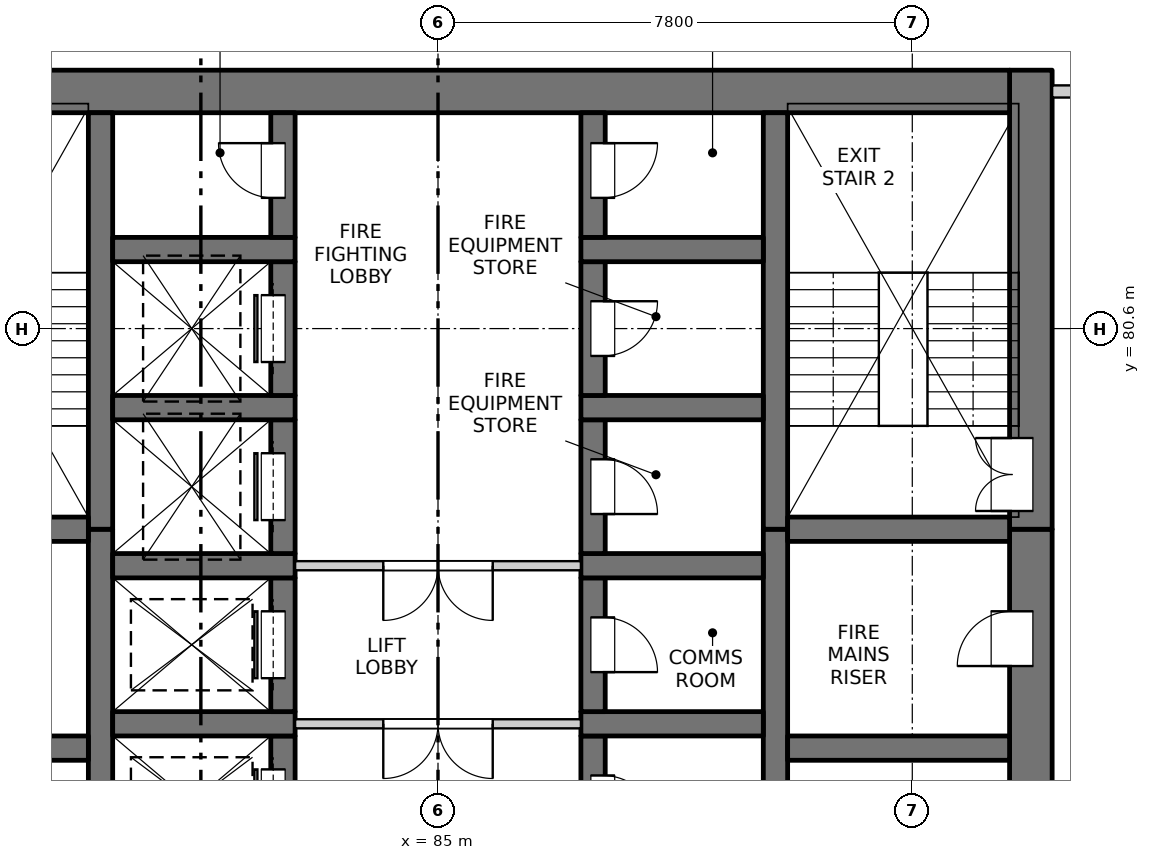
"""IFC4 building model, lengths in metres.
Left out: names, types, materials, properties, quantities, classifications, styles, units other than length and angle.
Written with IfcOpenShell. Run it as: python <this file> out.ifc"""

import sys

from ifc_helpers import new_model, si_unit, direction, frame, frame_2d, origin, place, context, subcontext, project, spatial, rectangle, extrude, element, fill, save


model = new_model("IFC4")
c1 = context("Model", 3, precision=1e-05, world=origin(), true_north=direction((0.0, 1.0)))
c2 = subcontext(c1, "Body", "Model", "MODEL_VIEW")
j1 = project(units=[si_unit("LENGTHUNIT", "METRE"), si_unit("PLANEANGLEUNIT", "RADIAN")], contexts=[c1])
p1 = place(None, origin())
s1 = spatial("IfcSite", under=j1, at=p1, CompositionType="ELEMENT")
p2 = place(p1, origin())
s2 = spatial("IfcBuilding", under=s1, at=p2, CompositionType="ELEMENT")
p3 = place(p2, frame((0.0, 0.0, 71.6)))
s3 = spatial("IfcBuildingStorey", under=s2, at=p3, CompositionType="ELEMENT", Elevation=71.6)
p4 = place(p3, frame((94.75, 61.95, -0.25), z_axis=(0.0, 0.0, 1.0), x_axis=(0.0, 1.0, 0.0)))
e1 = element("IfcWall", 1, at=p4, inside=s3, PredefinedType="SOLIDWALL", context=c2, shape_type="SweptSolid", body=[
    extrude(rectangle(XDim=15.35, YDim=0.7, at=frame_2d((7.675, 0.0))), origin(), (0.0, 0.0, 1.0), 3.4),
])
p5 = place(p4, frame((0.925, 0.0, 0.25)))
e2 = element("IfcOpeningElement", 2, at=p5, cuts=e1, PredefinedType="OPENING", context=c2, shape_type="SweptSolid", body=[
    extrude(rectangle(XDim=0.9, YDim=2.1, at=frame_2d((0.45, 1.05))), frame((0.0, 0.36, 0.0), z_axis=(0.0, -1.0, 0.0), x_axis=(1.0, 0.0, 0.0)), (0.0, 0.0, 1.0), 0.72),
])
p6 = place(p4, frame((3.8, 0.0, 0.25)))
e3 = element("IfcOpeningElement", 3, at=p6, cuts=e1, PredefinedType="OPENING", context=c2, shape_type="SweptSolid", body=[
    extrude(rectangle(XDim=0.9, YDim=2.1, at=frame_2d((0.45, 1.05))), frame((0.0, 0.36, 0.0), z_axis=(0.0, -1.0, 0.0), x_axis=(1.0, 0.0, 0.0)), (0.0, 0.0, 1.0), 0.72),
])
p7 = place(p4, frame((8.3, 0.0, 0.25)))
e4 = element("IfcOpeningElement", 4, at=p7, cuts=e1, PredefinedType="OPENING", context=c2, shape_type="SweptSolid", body=[
    extrude(rectangle(XDim=0.9, YDim=2.1, at=frame_2d((0.45, 1.05))), frame((0.0, 0.36, 0.0), z_axis=(0.0, -1.0, 0.0), x_axis=(1.0, 0.0, 0.0)), (0.0, 0.0, 1.0), 0.72),
])
p8 = place(p4, frame((13.1, 0.0, 0.25)))
e5 = element("IfcOpeningElement", 5, at=p8, cuts=e1, PredefinedType="OPENING", context=c2, shape_type="SweptSolid", body=[
    extrude(rectangle(XDim=0.9, YDim=2.1, at=frame_2d((0.45, 1.05))), frame((0.0, 0.36, 0.0), z_axis=(0.0, -1.0, 0.0), x_axis=(1.0, 0.0, 0.0)), (0.0, 0.0, 1.0), 0.72),
])
p9 = place(p3, frame((94.75, 77.3, -0.25), z_axis=(0.0, 0.0, 1.0), x_axis=(0.0, 1.0, 0.0)))
e6 = element("IfcWall", 6, at=p9, inside=s3, PredefinedType="SOLIDWALL", context=c2, shape_type="SweptSolid", body=[
    extrude(rectangle(XDim=7.55, YDim=0.7, at=frame_2d((3.775, 0.0))), origin(), (0.0, 0.0, 1.0), 3.4),
])
p10 = place(p9, frame((0.3, 0.0, 0.25)))
e7 = element("IfcOpeningElement", 7, at=p10, cuts=e6, PredefinedType="OPENING", context=c2, shape_type="SweptSolid", body=[
    extrude(rectangle(XDim=1.2, YDim=2.1, at=frame_2d((0.6, 1.05))), frame((0.0, 0.36, 0.0), z_axis=(0.0, -1.0, 0.0), x_axis=(1.0, 0.0, 0.0)), (0.0, 0.0, 1.0), 0.72),
])
p11 = place(p3, frame((75.6, 84.5, -0.25), z_axis=(0.0, 0.0, 1.0), x_axis=(1.0, 0.0, 0.0)))
e8 = element("IfcWall", 8, at=p11, inside=s3, PredefinedType="SOLIDWALL", context=c2, shape_type="SweptSolid", body=[
    extrude(rectangle(XDim=18.8, YDim=0.7, at=frame_2d((9.4, 0.0))), origin(), (0.0, 0.0, 1.0), 3.4),
])
p12 = place(p3, frame((79.45, 60.9, -0.25), z_axis=(0.0, 0.0, 1.0), x_axis=(0.0, 1.0, 0.0)))
e9 = element("IfcWall", 9, at=p12, inside=s3, PredefinedType="SOLIDWALL", context=c2, shape_type="SweptSolid", body=[
    extrude(rectangle(XDim=16.4, YDim=0.4, at=frame_2d((8.2, 0.0))), origin(), (0.0, 0.0, 1.0), 3.4),
])
p13 = place(p3, frame((79.45, 77.3, -0.25), z_axis=(0.0, 0.0, 1.0), x_axis=(0.0, 1.0, 0.0)))
e10 = element("IfcWall", 10, at=p13, inside=s3, PredefinedType="SOLIDWALL", context=c2, shape_type="SweptSolid", body=[
    extrude(rectangle(XDim=6.85, YDim=0.4, at=frame_2d((3.425, 0.0))), origin(), (0.0, 0.0, 1.0), 3.4),
])
p14 = place(p3, frame((90.55, 61.95, -0.25), z_axis=(0.0, 0.0, 1.0), x_axis=(0.0, 1.0, 0.0)))
e11 = element("IfcWall", 11, at=p14, inside=s3, PredefinedType="SOLIDWALL", context=c2, shape_type="SweptSolid", body=[
    extrude(rectangle(XDim=15.35, YDim=0.4, at=frame_2d((7.675, 0.0))), origin(), (0.0, 0.0, 1.0), 3.4),
])
p15 = place(p3, frame((90.55, 77.3, -0.25), z_axis=(0.0, 0.0, 1.0), x_axis=(0.0, 1.0, 0.0)))
e12 = element("IfcWall", 12, at=p15, inside=s3, PredefinedType="SOLIDWALL", context=c2, shape_type="SweptSolid", body=[
    extrude(rectangle(XDim=6.85, YDim=0.4, at=frame_2d((3.425, 0.0))), origin(), (0.0, 0.0, 1.0), 3.4),
])
p16 = place(p3, frame((82.45, 71.7, -0.25), z_axis=(0.0, 0.0, 1.0), x_axis=(0.0, 1.0, 0.0)))
e13 = element("IfcWall", 13, at=p16, inside=s3, PredefinedType="SOLIDWALL", context=c2, shape_type="SweptSolid", body=[
    extrude(rectangle(XDim=2.2, YDim=0.4, at=frame_2d((1.1, 0.0))), origin(), (0.0, 0.0, 1.0), 3.4),
])
p17 = place(p16, frame((0.55, 0.0, 0.25)))
e14 = element("IfcOpeningElement", 14, at=p17, cuts=e13, PredefinedType="OPENING", context=c2, shape_type="SweptSolid", body=[
    extrude(rectangle(XDim=1.1, YDim=2.1, at=frame_2d((0.55, 1.05))), frame((0.0, 0.21, 0.0), z_axis=(0.0, -1.0, 0.0), x_axis=(1.0, 0.0, 0.0)), (0.0, 0.0, 1.0), 0.42),
])
p18 = place(p3, frame((79.65, 74.1, -0.25), z_axis=(0.0, 0.0, 1.0), x_axis=(1.0, 0.0, 0.0)))
e15 = element("IfcWall", 15, at=p18, inside=s3, PredefinedType="SOLIDWALL", context=c2, shape_type="SweptSolid", body=[
    extrude(rectangle(XDim=3.0, YDim=0.4, at=frame_2d((1.5, 0.0))), origin(), (0.0, 0.0, 1.0), 3.4),
])
p19 = place(p3, frame((82.45, 74.3, -0.25), z_axis=(0.0, 0.0, 1.0), x_axis=(0.0, 1.0, 0.0)))
e16 = element("IfcWall", 16, at=p19, inside=s3, PredefinedType="SOLIDWALL", context=c2, shape_type="SweptSolid", body=[
    extrude(rectangle(XDim=2.2, YDim=0.4, at=frame_2d((1.1, 0.0))), origin(), (0.0, 0.0, 1.0), 3.4),
])
p20 = place(p19, frame((0.55, 0.0, 0.25)))
e17 = element("IfcOpeningElement", 17, at=p20, cuts=e16, PredefinedType="OPENING", context=c2, shape_type="SweptSolid", body=[
    extrude(rectangle(XDim=1.1, YDim=2.1, at=frame_2d((0.55, 1.05))), frame((0.0, 0.21, 0.0), z_axis=(0.0, -1.0, 0.0), x_axis=(1.0, 0.0, 0.0)), (0.0, 0.0, 1.0), 0.42),
])
p21 = place(p3, frame((79.65, 76.7, -0.25), z_axis=(0.0, 0.0, 1.0), x_axis=(1.0, 0.0, 0.0)))
e18 = element("IfcWall", 18, at=p21, inside=s3, PredefinedType="SOLIDWALL", context=c2, shape_type="SweptSolid", body=[
    extrude(rectangle(XDim=3.0, YDim=0.4, at=frame_2d((1.5, 0.0))), origin(), (0.0, 0.0, 1.0), 3.4),
])
p22 = place(p3, frame((82.45, 76.9, -0.25), z_axis=(0.0, 0.0, 1.0), x_axis=(0.0, 1.0, 0.0)))
e19 = element("IfcWall", 19, at=p22, inside=s3, PredefinedType="SOLIDWALL", context=c2, shape_type="SweptSolid", body=[
    extrude(rectangle(XDim=2.2, YDim=0.4, at=frame_2d((1.1, 0.0))), origin(), (0.0, 0.0, 1.0), 3.4),
])
p23 = place(p22, frame((0.55, 0.0, 0.25)))
e20 = element("IfcOpeningElement", 20, at=p23, cuts=e19, PredefinedType="OPENING", context=c2, shape_type="SweptSolid", body=[
    extrude(rectangle(XDim=1.1, YDim=2.1, at=frame_2d((0.55, 1.05))), frame((0.0, 0.21, 0.0), z_axis=(0.0, -1.0, 0.0), x_axis=(1.0, 0.0, 0.0)), (0.0, 0.0, 1.0), 0.42),
])
p24 = place(p3, frame((79.65, 79.3, -0.25), z_axis=(0.0, 0.0, 1.0), x_axis=(1.0, 0.0, 0.0)))
e21 = element("IfcWall", 21, at=p24, inside=s3, PredefinedType="SOLIDWALL", context=c2, shape_type="SweptSolid", body=[
    extrude(rectangle(XDim=3.0, YDim=0.4, at=frame_2d((1.5, 0.0))), origin(), (0.0, 0.0, 1.0), 3.4),
])
p25 = place(p3, frame((82.45, 79.5, -0.25), z_axis=(0.0, 0.0, 1.0), x_axis=(0.0, 1.0, 0.0)))
e22 = element("IfcWall", 22, at=p25, inside=s3, PredefinedType="SOLIDWALL", context=c2, shape_type="SweptSolid", body=[
    extrude(rectangle(XDim=2.2, YDim=0.4, at=frame_2d((1.1, 0.0))), origin(), (0.0, 0.0, 1.0), 3.4),
])
p26 = place(p25, frame((0.55, 0.0, 0.25)))
e23 = element("IfcOpeningElement", 23, at=p26, cuts=e22, PredefinedType="OPENING", context=c2, shape_type="SweptSolid", body=[
    extrude(rectangle(XDim=1.1, YDim=2.1, at=frame_2d((0.55, 1.05))), frame((0.0, 0.21, 0.0), z_axis=(0.0, -1.0, 0.0), x_axis=(1.0, 0.0, 0.0)), (0.0, 0.0, 1.0), 0.42),
])
p27 = place(p3, frame((79.65, 81.9, -0.25), z_axis=(0.0, 0.0, 1.0), x_axis=(1.0, 0.0, 0.0)))
e24 = element("IfcWall", 24, at=p27, inside=s3, PredefinedType="SOLIDWALL", context=c2, shape_type="SweptSolid", body=[
    extrude(rectangle(XDim=3.0, YDim=0.4, at=frame_2d((1.5, 0.0))), origin(), (0.0, 0.0, 1.0), 3.4),
])
p28 = place(p3, frame((82.45, 82.1, -0.25), z_axis=(0.0, 0.0, 1.0), x_axis=(0.0, 1.0, 0.0)))
e25 = element("IfcWall", 25, at=p28, inside=s3, PredefinedType="SOLIDWALL", context=c2, shape_type="SweptSolid", body=[
    extrude(rectangle(XDim=2.05, YDim=0.4, at=frame_2d((1.025, 0.0))), origin(), (0.0, 0.0, 1.0), 3.4),
])
p29 = place(p28, frame((0.65, 0.0, 0.25)))
e26 = element("IfcOpeningElement", 26, at=p29, cuts=e25, PredefinedType="OPENING", context=c2, shape_type="SweptSolid", body=[
    extrude(rectangle(XDim=0.9, YDim=2.1, at=frame_2d((0.45, 1.05))), frame((0.0, 0.21, 0.0), z_axis=(0.0, -1.0, 0.0), x_axis=(1.0, 0.0, 0.0)), (0.0, 0.0, 1.0), 0.42),
])
p30 = place(p3, frame((87.55, 71.7, -0.25), z_axis=(0.0, 0.0, 1.0), x_axis=(0.0, 1.0, 0.0)))
e27 = element("IfcWall", 27, at=p30, inside=s3, PredefinedType="SOLIDWALL", context=c2, shape_type="SweptSolid", body=[
    extrude(rectangle(XDim=2.2, YDim=0.4, at=frame_2d((1.1, 0.0))), origin(), (0.0, 0.0, 1.0), 3.4),
])
p31 = place(p30, frame((0.65, 0.0, 0.25)))
e28 = element("IfcOpeningElement", 28, at=p31, cuts=e27, PredefinedType="OPENING", context=c2, shape_type="SweptSolid", body=[
    extrude(rectangle(XDim=0.9, YDim=2.1, at=frame_2d((0.45, 1.05))), frame((0.0, 0.21, 0.0), z_axis=(0.0, -1.0, 0.0), x_axis=(1.0, 0.0, 0.0)), (0.0, 0.0, 1.0), 0.42),
])
p32 = place(p3, frame((87.35, 74.1, -0.25), z_axis=(0.0, 0.0, 1.0), x_axis=(1.0, 0.0, 0.0)))
e29 = element("IfcWall", 29, at=p32, inside=s3, PredefinedType="SOLIDWALL", context=c2, shape_type="SweptSolid", body=[
    extrude(rectangle(XDim=3.0, YDim=0.4, at=frame_2d((1.5, 0.0))), origin(), (0.0, 0.0, 1.0), 3.4),
])
p33 = place(p3, frame((87.55, 74.3, -0.25), z_axis=(0.0, 0.0, 1.0), x_axis=(0.0, 1.0, 0.0)))
e30 = element("IfcWall", 30, at=p33, inside=s3, PredefinedType="SOLIDWALL", context=c2, shape_type="SweptSolid", body=[
    extrude(rectangle(XDim=2.2, YDim=0.4, at=frame_2d((1.1, 0.0))), origin(), (0.0, 0.0, 1.0), 3.4),
])
p34 = place(p33, frame((0.65, 0.0, 0.25)))
e31 = element("IfcOpeningElement", 31, at=p34, cuts=e30, PredefinedType="OPENING", context=c2, shape_type="SweptSolid", body=[
    extrude(rectangle(XDim=0.9, YDim=2.1, at=frame_2d((0.45, 1.05))), frame((0.0, 0.21, 0.0), z_axis=(0.0, -1.0, 0.0), x_axis=(1.0, 0.0, 0.0)), (0.0, 0.0, 1.0), 0.42),
])
p35 = place(p3, frame((87.35, 76.7, -0.25), z_axis=(0.0, 0.0, 1.0), x_axis=(1.0, 0.0, 0.0)))
e32 = element("IfcWall", 32, at=p35, inside=s3, PredefinedType="SOLIDWALL", context=c2, shape_type="SweptSolid", body=[
    extrude(rectangle(XDim=3.0, YDim=0.4, at=frame_2d((1.5, 0.0))), origin(), (0.0, 0.0, 1.0), 3.4),
])
p36 = place(p3, frame((87.55, 76.9, -0.25), z_axis=(0.0, 0.0, 1.0), x_axis=(0.0, 1.0, 0.0)))
e33 = element("IfcWall", 33, at=p36, inside=s3, PredefinedType="SOLIDWALL", context=c2, shape_type="SweptSolid", body=[
    extrude(rectangle(XDim=2.2, YDim=0.4, at=frame_2d((1.1, 0.0))), origin(), (0.0, 0.0, 1.0), 3.4),
])
p37 = place(p36, frame((0.65, 0.0, 0.25)))
e34 = element("IfcOpeningElement", 34, at=p37, cuts=e33, PredefinedType="OPENING", context=c2, shape_type="SweptSolid", body=[
    extrude(rectangle(XDim=0.9, YDim=2.1, at=frame_2d((0.45, 1.05))), frame((0.0, 0.21, 0.0), z_axis=(0.0, -1.0, 0.0), x_axis=(1.0, 0.0, 0.0)), (0.0, 0.0, 1.0), 0.42),
])
p38 = place(p3, frame((87.35, 79.3, -0.25), z_axis=(0.0, 0.0, 1.0), x_axis=(1.0, 0.0, 0.0)))
e35 = element("IfcWall", 35, at=p38, inside=s3, PredefinedType="SOLIDWALL", context=c2, shape_type="SweptSolid", body=[
    extrude(rectangle(XDim=3.0, YDim=0.4, at=frame_2d((1.5, 0.0))), origin(), (0.0, 0.0, 1.0), 3.4),
])
p39 = place(p3, frame((87.55, 79.5, -0.25), z_axis=(0.0, 0.0, 1.0), x_axis=(0.0, 1.0, 0.0)))
e36 = element("IfcWall", 36, at=p39, inside=s3, PredefinedType="SOLIDWALL", context=c2, shape_type="SweptSolid", body=[
    extrude(rectangle(XDim=2.2, YDim=0.4, at=frame_2d((1.1, 0.0))), origin(), (0.0, 0.0, 1.0), 3.4),
])
p40 = place(p39, frame((0.65, 0.0, 0.25)))
e37 = element("IfcOpeningElement", 37, at=p40, cuts=e36, PredefinedType="OPENING", context=c2, shape_type="SweptSolid", body=[
    extrude(rectangle(XDim=0.9, YDim=2.1, at=frame_2d((0.45, 1.05))), frame((0.0, 0.21, 0.0), z_axis=(0.0, -1.0, 0.0), x_axis=(1.0, 0.0, 0.0)), (0.0, 0.0, 1.0), 0.42),
])
p41 = place(p3, frame((87.35, 81.9, -0.25), z_axis=(0.0, 0.0, 1.0), x_axis=(1.0, 0.0, 0.0)))
e38 = element("IfcWall", 38, at=p41, inside=s3, PredefinedType="SOLIDWALL", context=c2, shape_type="SweptSolid", body=[
    extrude(rectangle(XDim=3.0, YDim=0.4, at=frame_2d((1.5, 0.0))), origin(), (0.0, 0.0, 1.0), 3.4),
])
p42 = place(p3, frame((87.55, 82.1, -0.25), z_axis=(0.0, 0.0, 1.0), x_axis=(0.0, 1.0, 0.0)))
e39 = element("IfcWall", 39, at=p42, inside=s3, PredefinedType="SOLIDWALL", context=c2, shape_type="SweptSolid", body=[
    extrude(rectangle(XDim=2.05, YDim=0.4, at=frame_2d((1.025, 0.0))), origin(), (0.0, 0.0, 1.0), 3.4),
])
p43 = place(p42, frame((0.65, 0.0, 0.25)))
e40 = element("IfcOpeningElement", 40, at=p43, cuts=e39, PredefinedType="OPENING", context=c2, shape_type="SweptSolid", body=[
    extrude(rectangle(XDim=0.9, YDim=2.1, at=frame_2d((0.45, 1.05))), frame((0.0, 0.21, 0.0), z_axis=(0.0, -1.0, 0.0), x_axis=(1.0, 0.0, 0.0)), (0.0, 0.0, 1.0), 0.42),
])
for number, where, z_axis, x_axis in (
    (41, (75.6, 73.7, -0.25), (0.0, 0.0, 1.0), (1.0, 0.0, 0.0)),
    (42, (75.6, 77.3, -0.25), (0.0, 0.0, 1.0), (1.0, 0.0, 0.0)),
    (43, (90.75, 73.7, -0.25), (0.0, 0.0, 1.0), (1.0, 0.0, 0.0)),
    (44, (90.75, 77.3, -0.25), (0.0, 0.0, 1.0), (1.0, 0.0, 0.0)),
):
    element("IfcWall", number, at=place(p3, frame(where, z_axis=z_axis, x_axis=x_axis)), inside=s3, PredefinedType="SOLIDWALL", context=c2, shape_type="SweptSolid", body=[
        extrude(rectangle(XDim=3.65, YDim=0.4, at=frame_2d((1.825, 0.0))), origin(), (0.0, 0.0, 1.0), 3.4),
    ])
p44 = place(p3, frame((82.65, 74.1, 0.0), z_axis=(0.0, 0.0, 1.0), x_axis=(1.0, 0.0, 0.0)))
e45 = element("IfcWall", 45, at=p44, inside=s3, PredefinedType="PARTITIONING", context=c2, shape_type="SweptSolid", body=[
    extrude(rectangle(XDim=4.7, YDim=0.15, at=frame_2d((2.35, 0.0))), origin(), (0.0, 0.0, 1.0), 3.15),
])
p45 = place(p44, frame((1.45, 0.0, 0.0)))
e46 = element("IfcOpeningElement", 46, at=p45, cuts=e45, PredefinedType="OPENING", context=c2, shape_type="SweptSolid", body=[
    extrude(rectangle(XDim=1.8, YDim=2.1, at=frame_2d((0.9, 1.05))), frame((0.0, 0.085, 0.0), z_axis=(0.0, -1.0, 0.0), x_axis=(1.0, 0.0, 0.0)), (0.0, 0.0, 1.0), 0.17),
])
p46 = place(p3, frame((82.65, 76.7, 0.0), z_axis=(0.0, 0.0, 1.0), x_axis=(1.0, 0.0, 0.0)))
e47 = element("IfcWall", 47, at=p46, inside=s3, PredefinedType="PARTITIONING", context=c2, shape_type="SweptSolid", body=[
    extrude(rectangle(XDim=4.7, YDim=0.15, at=frame_2d((2.35, 0.0))), origin(), (0.0, 0.0, 1.0), 3.15),
])
p47 = place(p46, frame((1.45, 0.0, 0.0)))
e48 = element("IfcOpeningElement", 48, at=p47, cuts=e47, PredefinedType="OPENING", context=c2, shape_type="SweptSolid", body=[
    extrude(rectangle(XDim=1.8, YDim=2.1, at=frame_2d((0.9, 1.05))), frame((0.0, 0.085, 0.0), z_axis=(0.0, -1.0, 0.0), x_axis=(1.0, 0.0, 0.0)), (0.0, 0.0, 1.0), 0.17),
])
p48 = place(p3, frame((95.1, 84.5, 0.0), z_axis=(0.0, 0.0, 1.0), x_axis=(1.0, 0.0, 0.0)))
e49 = element("IfcWall", 49, at=p48, inside=s3, PredefinedType="PARTITIONING", context=c2, shape_type="SweptSolid", body=[
    extrude(rectangle(XDim=1.7, YDim=0.2, at=frame_2d((0.85, 0.0))), origin(), (0.0, 0.0, 1.0), 3.15),
])
p49 = place(p17, origin())
e50 = element("IfcDoor", 50, at=p49, inside=s3, OperationType="SLIDING_TO_LEFT", PredefinedType="DOOR", context=c2, shape_type="SweptSolid", body=[
    extrude(rectangle(XDim=1.1, YDim=2.1, at=frame_2d((0.55, 1.05))), frame((0.0, 0.185, 0.0), z_axis=(0.0, -1.0, 0.0), x_axis=(1.0, 0.0, 0.0)), (0.0, 0.0, 1.0), 0.05),
])
fill(e14, e50)
p50 = place(p31, origin())
e51 = element("IfcDoor", 51, at=p50, inside=s3, OperationType="SINGLE_SWING_RIGHT", PredefinedType="DOOR", context=c2, shape_type="SweptSolid", body=[
    extrude(rectangle(XDim=0.9, YDim=2.1, at=frame_2d((0.45, 1.05))), frame((0.0, -0.135, 0.0), z_axis=(0.0, -1.0, 0.0), x_axis=(1.0, 0.0, 0.0)), (0.0, 0.0, 1.0), 0.05),
])
fill(e28, e51)
p51 = place(p45, origin())
e52 = element("IfcDoor", 52, at=p51, inside=s3, OperationType="DOUBLE_DOOR_SINGLE_SWING", PredefinedType="DOOR", context=c2, shape_type="SweptSolid", body=[
    extrude(rectangle(XDim=1.8, YDim=2.1, at=frame_2d((0.9, 1.05))), frame((0.0, 0.025, 0.0), z_axis=(0.0, -1.0, 0.0), x_axis=(1.0, 0.0, 0.0)), (0.0, 0.0, 1.0), 0.05),
])
fill(e46, e52)
p52 = place(p20, origin())
e53 = element("IfcDoor", 53, at=p52, inside=s3, OperationType="SLIDING_TO_LEFT", PredefinedType="DOOR", context=c2, shape_type="SweptSolid", body=[
    extrude(rectangle(XDim=1.1, YDim=2.1, at=frame_2d((0.55, 1.05))), frame((0.0, 0.185, 0.0), z_axis=(0.0, -1.0, 0.0), x_axis=(1.0, 0.0, 0.0)), (0.0, 0.0, 1.0), 0.05),
])
fill(e17, e53)
p53 = place(p34, origin())
e54 = element("IfcDoor", 54, at=p53, inside=s3, OperationType="SINGLE_SWING_RIGHT", PredefinedType="DOOR", context=c2, shape_type="SweptSolid", body=[
    extrude(rectangle(XDim=0.9, YDim=2.1, at=frame_2d((0.45, 1.05))), frame((0.0, -0.135, 0.0), z_axis=(0.0, -1.0, 0.0), x_axis=(1.0, 0.0, 0.0)), (0.0, 0.0, 1.0), 0.05),
])
fill(e31, e54)
p54 = place(p8, origin())
e55 = element("IfcDoor", 55, at=p54, inside=s3, OperationType="SINGLE_SWING_LEFT", PredefinedType="DOOR", context=c2, shape_type="SweptSolid", body=[
    extrude(rectangle(XDim=0.9, YDim=2.1, at=frame_2d((0.45, 1.05))), frame((0.0, 0.335, 0.0), z_axis=(0.0, -1.0, 0.0), x_axis=(1.0, 0.0, 0.0)), (0.0, 0.0, 1.0), 0.05),
])
fill(e5, e55)
p55 = place(p47, origin())
e56 = element("IfcDoor", 56, at=p55, inside=s3, OperationType="DOUBLE_DOOR_SINGLE_SWING", PredefinedType="DOOR", context=c2, shape_type="SweptSolid", body=[
    extrude(rectangle(XDim=1.8, YDim=2.1, at=frame_2d((0.9, 1.05))), frame((0.0, 0.025, 0.0), z_axis=(0.0, -1.0, 0.0), x_axis=(1.0, 0.0, 0.0)), (0.0, 0.0, 1.0), 0.05),
])
fill(e48, e56)
p56 = place(p23, origin())
e57 = element("IfcDoor", 57, at=p56, inside=s3, OperationType="SLIDING_TO_LEFT", PredefinedType="DOOR", context=c2, shape_type="SweptSolid", body=[
    extrude(rectangle(XDim=1.1, YDim=2.1, at=frame_2d((0.55, 1.05))), frame((0.0, 0.185, 0.0), z_axis=(0.0, -1.0, 0.0), x_axis=(1.0, 0.0, 0.0)), (0.0, 0.0, 1.0), 0.05),
])
fill(e20, e57)
p57 = place(p37, origin())
e58 = element("IfcDoor", 58, at=p57, inside=s3, OperationType="SINGLE_SWING_RIGHT", PredefinedType="DOOR", context=c2, shape_type="SweptSolid", body=[
    extrude(rectangle(XDim=0.9, YDim=2.1, at=frame_2d((0.45, 1.05))), frame((0.0, -0.135, 0.0), z_axis=(0.0, -1.0, 0.0), x_axis=(1.0, 0.0, 0.0)), (0.0, 0.0, 1.0), 0.05),
])
fill(e34, e58)
p58 = place(p10, origin())
e59 = element("IfcDoor", 59, at=p58, inside=s3, OperationType="DOUBLE_DOOR_SINGLE_SWING", PredefinedType="DOOR", context=c2, shape_type="SweptSolid", body=[
    extrude(rectangle(XDim=1.2, YDim=2.1, at=frame_2d((0.6, 1.05))), frame((0.0, 0.335, 0.0), z_axis=(0.0, -1.0, 0.0), x_axis=(1.0, 0.0, 0.0)), (0.0, 0.0, 1.0), 0.05),
])
fill(e7, e59)
p59 = place(p26, origin())
e60 = element("IfcDoor", 60, at=p59, inside=s3, OperationType="SLIDING_TO_LEFT", PredefinedType="DOOR", context=c2, shape_type="SweptSolid", body=[
    extrude(rectangle(XDim=1.1, YDim=2.1, at=frame_2d((0.55, 1.05))), frame((0.0, 0.185, 0.0), z_axis=(0.0, -1.0, 0.0), x_axis=(1.0, 0.0, 0.0)), (0.0, 0.0, 1.0), 0.05),
])
fill(e23, e60)
p60 = place(p40, origin())
e61 = element("IfcDoor", 61, at=p60, inside=s3, OperationType="SINGLE_SWING_LEFT", PredefinedType="DOOR", context=c2, shape_type="SweptSolid", body=[
    extrude(rectangle(XDim=0.9, YDim=2.1, at=frame_2d((0.45, 1.05))), frame((0.0, -0.135, 0.0), z_axis=(0.0, -1.0, 0.0), x_axis=(1.0, 0.0, 0.0)), (0.0, 0.0, 1.0), 0.05),
])
fill(e37, e61)
p61 = place(p29, origin())
e62 = element("IfcDoor", 62, at=p61, inside=s3, OperationType="SINGLE_SWING_RIGHT", PredefinedType="DOOR", context=c2, shape_type="SweptSolid", body=[
    extrude(rectangle(XDim=0.9, YDim=2.1, at=frame_2d((0.45, 1.05))), frame((0.0, 0.185, 0.0), z_axis=(0.0, -1.0, 0.0), x_axis=(1.0, 0.0, 0.0)), (0.0, 0.0, 1.0), 0.05),
])
fill(e26, e62)
p62 = place(p43, origin())
e63 = element("IfcDoor", 63, at=p62, inside=s3, OperationType="SINGLE_SWING_LEFT", PredefinedType="DOOR", context=c2, shape_type="SweptSolid", body=[
    extrude(rectangle(XDim=0.9, YDim=2.1, at=frame_2d((0.45, 1.05))), frame((0.0, -0.135, 0.0), z_axis=(0.0, -1.0, 0.0), x_axis=(1.0, 0.0, 0.0)), (0.0, 0.0, 1.0), 0.05),
])
fill(e40, e63)
save(model, sys.argv[1])
